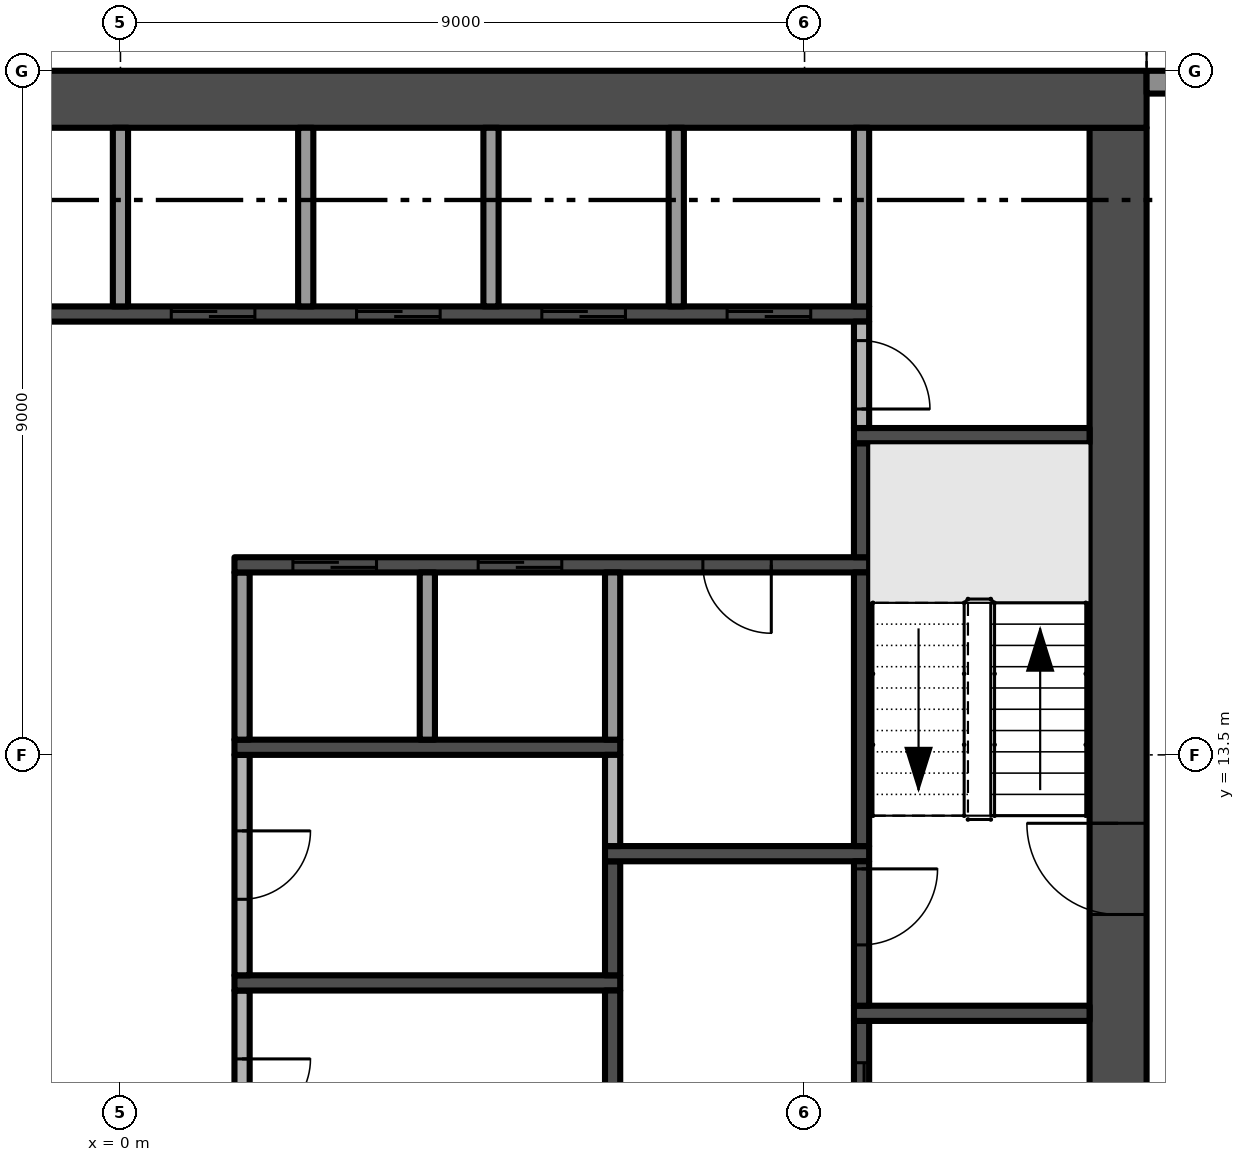
"""IFC4 building model, lengths in metres.
Left out: names, types, materials, properties, quantities, classifications, styles, units other than length and angle.
Written with IfcOpenShell. Run it as: python <this file> out.ifc"""

import sys

from ifc_helpers import new_model, si_unit, direction, frame, frame_2d, origin, place, context, subcontext, project, spatial, rectangle, extrude, element, fill, save


model = new_model("IFC4")
c1 = context("Model", 3, precision=1e-05, world=origin(), true_north=direction((0.0, 1.0)))
c2 = subcontext(c1, "Body", "Model", "MODEL_VIEW")
j1 = project(units=[si_unit("LENGTHUNIT", "METRE"), si_unit("PLANEANGLEUNIT", "RADIAN")], contexts=[c1])
p1 = place(None, origin())
s1 = spatial("IfcSite", under=j1, at=p1, CompositionType="ELEMENT")
p2 = place(p1, origin())
s2 = spatial("IfcBuilding", under=s1, at=p2, CompositionType="ELEMENT")
p3 = place(p2, frame((0.0, 0.0, 170.6)))
s3 = spatial("IfcBuildingStorey", under=s2, at=p3, CompositionType="ELEMENT", Elevation=170.6)
p4 = place(p3, frame((13.125, 5.25, -0.3), z_axis=(0.0, 0.0, 1.0), x_axis=(0.0, 1.0, 0.0)))
e1 = element("IfcWall", 1, at=p4, inside=s3, PredefinedType="SHEAR", context=c2, shape_type="SweptSolid", body=[
    extrude(rectangle(XDim=16.5, YDim=0.75, at=frame_2d((8.25, 0.0))), origin(), (0.0, 0.0, 1.0), 3.8),
])
p5 = place(p4, frame((6.15, 0.0, 0.3)))
e2 = element("IfcOpeningElement", 2, at=p5, cuts=e1, PredefinedType="OPENING", context=c2, shape_type="SweptSolid", body=[
    extrude(rectangle(XDim=1.2, YDim=2.2, at=frame_2d((0.6, 1.1))), frame((0.0, 0.385, 0.0), z_axis=(0.0, -1.0, 0.0), x_axis=(1.0, 0.0, 0.0)), (0.0, 0.0, 1.0), 0.77),
])
p6 = place(p3, frame((13.5, 22.125, -0.3), z_axis=(0.0, 0.0, 1.0), x_axis=(-1.0, 0.0, 0.0)))
e3 = element("IfcWall", 3, at=p6, inside=s3, PredefinedType="SHEAR", context=c2, shape_type="SweptSolid", body=[
    extrude(rectangle(XDim=27.0, YDim=0.75, at=frame_2d((13.5, 0.0))), origin(), (0.0, 0.0, 1.0), 3.8),
])
p7 = place(p3, frame((13.5, 22.35, 0.0), z_axis=(0.0, 0.0, 1.0), x_axis=(1.0, 0.0, 0.0)))
e4 = element("IfcWall", 4, at=p7, inside=s3, PredefinedType="SOLIDWALL", context=c2, shape_type="SweptSolid", body=[
    extrude(rectangle(XDim=3.4, YDim=0.3, at=frame_2d((1.7, 0.0))), origin(), (0.0, 0.0, 1.0), 3.5),
])
p8 = place(p7, frame((0.7, 0.0, 0.0)))
e5 = element("IfcOpeningElement", 5, at=p8, cuts=e4, PredefinedType="OPENING", context=c2, shape_type="SweptSolid", body=[
    extrude(rectangle(XDim=2.4, YDim=2.4, at=frame_2d((1.2, 1.2))), frame((0.0, 0.16, 0.0), z_axis=(0.0, -1.0, 0.0), x_axis=(1.0, 0.0, 0.0)), (0.0, 0.0, 1.0), 0.32),
])
p9 = place(p3, frame((-9.85, 19.3, 0.0), z_axis=(0.0, 0.0, 1.0), x_axis=(1.0, 0.0, 0.0)))
e6 = element("IfcWall", 6, at=p9, inside=s3, PredefinedType="SHEAR", context=c2, shape_type="SweptSolid", body=[
    extrude(rectangle(XDim=19.7, YDim=0.2, at=frame_2d((9.85, 0.0))), origin(), (0.0, 0.0, 1.0), 3.5),
])
p10 = place(p9, frame((10.519, 0.0, 0.0)))
e7 = element("IfcOpeningElement", 7, at=p10, cuts=e6, PredefinedType="OPENING", context=c2, shape_type="SweptSolid", body=[
    extrude(rectangle(XDim=1.1, YDim=2.1, at=frame_2d((0.55, 1.05))), frame((0.0, 0.11, 0.0), z_axis=(0.0, -1.0, 0.0), x_axis=(1.0, 0.0, 0.0)), (0.0, 0.0, 1.0), 0.22),
])
p11 = place(p9, frame((12.956, 0.0, 0.0)))
e8 = element("IfcOpeningElement", 8, at=p11, cuts=e6, PredefinedType="OPENING", context=c2, shape_type="SweptSolid", body=[
    extrude(rectangle(XDim=1.1, YDim=2.1, at=frame_2d((0.55, 1.05))), frame((0.0, 0.11, 0.0), z_axis=(0.0, -1.0, 0.0), x_axis=(1.0, 0.0, 0.0)), (0.0, 0.0, 1.0), 0.22),
])
p12 = place(p9, frame((15.394, 0.0, 0.0)))
e9 = element("IfcOpeningElement", 9, at=p12, cuts=e6, PredefinedType="OPENING", context=c2, shape_type="SweptSolid", body=[
    extrude(rectangle(XDim=1.1, YDim=2.1, at=frame_2d((0.55, 1.05))), frame((0.0, 0.11, 0.0), z_axis=(0.0, -1.0, 0.0), x_axis=(1.0, 0.0, 0.0)), (0.0, 0.0, 1.0), 0.22),
])
p13 = place(p9, frame((17.831, 0.0, 0.0)))
e10 = element("IfcOpeningElement", 10, at=p13, cuts=e6, PredefinedType="OPENING", context=c2, shape_type="SweptSolid", body=[
    extrude(rectangle(XDim=1.1, YDim=2.1, at=frame_2d((0.55, 1.05))), frame((0.0, 0.11, 0.0), z_axis=(0.0, -1.0, 0.0), x_axis=(1.0, 0.0, 0.0)), (0.0, 0.0, 1.0), 0.22),
])
p14 = place(p9, frame((2.087, 0.0, 0.0)))
e11 = element("IfcOpeningElement", 11, at=p14, cuts=e6, PredefinedType="OPENING", context=c2, shape_type="SweptSolid", body=[
    extrude(rectangle(XDim=0.9, YDim=2.1, at=frame_2d((0.45, 1.05))), frame((0.0, 0.11, 0.0), z_axis=(0.0, -1.0, 0.0), x_axis=(1.0, 0.0, 0.0)), (0.0, 0.0, 1.0), 0.22),
])
p15 = place(p9, frame((6.963, 0.0, 0.0)))
e12 = element("IfcOpeningElement", 12, at=p15, cuts=e6, PredefinedType="OPENING", context=c2, shape_type="SweptSolid", body=[
    extrude(rectangle(XDim=0.9, YDim=2.1, at=frame_2d((0.45, 1.05))), frame((0.0, 0.11, 0.0), z_axis=(0.0, -1.0, 0.0), x_axis=(1.0, 0.0, 0.0)), (0.0, 0.0, 1.0), 0.22),
])
p16 = place(p3, frame((0.0, 19.4, 0.0), z_axis=(0.0, 0.0, 1.0), x_axis=(0.0, 1.0, 0.0)))
e13 = element("IfcWall", 13, at=p16, inside=s3, PredefinedType="PARTITIONING", context=c2, shape_type="SweptSolid", body=[
    extrude(rectangle(XDim=2.35, YDim=0.2, at=frame_2d((1.175, 0.0))), origin(), (0.0, 0.0, 1.0), 3.5),
])
p17 = place(p3, frame((1.6, 10.4, 0.0), z_axis=(0.0, 0.0, 1.0), x_axis=(0.0, -1.0, 0.0)))
e14 = element("IfcWall", 14, at=p17, inside=s3, PredefinedType="PARTITIONING", context=c2, shape_type="SweptSolid", body=[
    extrude(rectangle(XDim=2.7, YDim=0.2, at=frame_2d((1.35, 0.0))), origin(), (0.0, 0.0, 1.0), 3.5),
])
p18 = place(p17, frame((0.9, 0.0, 0.0)))
e15 = element("IfcOpeningElement", 15, at=p18, cuts=e14, PredefinedType="OPENING", context=c2, shape_type="SweptSolid", body=[
    extrude(rectangle(XDim=0.9, YDim=2.1, at=frame_2d((0.45, 1.05))), frame((0.0, 0.11, 0.0), z_axis=(0.0, -1.0, 0.0), x_axis=(1.0, 0.0, 0.0)), (0.0, 0.0, 1.0), 0.22),
])
p19 = place(p3, frame((1.5, 10.5, 0.0), z_axis=(0.0, 0.0, 1.0), x_axis=(1.0, 0.0, 0.0)))
e16 = element("IfcWall", 16, at=p19, inside=s3, PredefinedType="SHEAR", context=c2, shape_type="SweptSolid", body=[
    extrude(rectangle(XDim=5.075, YDim=0.2, at=frame_2d((2.538, 0.0))), origin(), (0.0, 0.0, 1.0), 3.5),
])
p20 = place(p3, frame((1.6, 13.5, 0.0), z_axis=(0.0, 0.0, 1.0), x_axis=(0.0, -1.0, 0.0)))
e17 = element("IfcWall", 17, at=p20, inside=s3, PredefinedType="PARTITIONING", context=c2, shape_type="SweptSolid", body=[
    extrude(rectangle(XDim=2.9, YDim=0.2, at=frame_2d((1.45, 0.0))), origin(), (0.0, 0.0, 1.0), 3.5),
])
p21 = place(p20, frame((1.0, 0.0, 0.0)))
e18 = element("IfcOpeningElement", 18, at=p21, cuts=e17, PredefinedType="OPENING", context=c2, shape_type="SweptSolid", body=[
    extrude(rectangle(XDim=0.9, YDim=2.1, at=frame_2d((0.45, 1.05))), frame((0.0, 0.11, 0.0), z_axis=(0.0, -1.0, 0.0), x_axis=(1.0, 0.0, 0.0)), (0.0, 0.0, 1.0), 0.22),
])
p22 = place(p3, frame((1.5, 13.6, 0.0), z_axis=(0.0, 0.0, 1.0), x_axis=(1.0, 0.0, 0.0)))
e19 = element("IfcWall", 19, at=p22, inside=s3, PredefinedType="SHEAR", context=c2, shape_type="SweptSolid", body=[
    extrude(rectangle(XDim=5.075, YDim=0.2, at=frame_2d((2.538, 0.0))), origin(), (0.0, 0.0, 1.0), 3.5),
])
p23 = place(p3, frame((1.6, 13.7, 0.0), z_axis=(0.0, 0.0, 1.0), x_axis=(0.0, 1.0, 0.0)))
e20 = element("IfcWall", 20, at=p23, inside=s3, PredefinedType="PARTITIONING", context=c2, shape_type="SweptSolid", body=[
    extrude(rectangle(XDim=2.2, YDim=0.2, at=frame_2d((1.1, 0.0))), origin(), (0.0, 0.0, 1.0), 3.5),
])
p24 = place(p3, frame((9.85, 16.0, 0.0), z_axis=(0.0, 0.0, 1.0), x_axis=(-1.0, 0.0, 0.0)))
e21 = element("IfcWall", 21, at=p24, inside=s3, PredefinedType="SHEAR", context=c2, shape_type="SweptSolid", body=[
    extrude(rectangle(XDim=8.35, YDim=0.2, at=frame_2d((4.175, 0.0))), origin(), (0.0, 0.0, 1.0), 3.5),
])
p25 = place(p24, frame((6.481, 0.0, 0.0)))
e22 = element("IfcOpeningElement", 22, at=p25, cuts=e21, PredefinedType="OPENING", context=c2, shape_type="SweptSolid", body=[
    extrude(rectangle(XDim=1.1, YDim=2.1, at=frame_2d((0.55, 1.05))), frame((0.0, 0.11, 0.0), z_axis=(0.0, -1.0, 0.0), x_axis=(1.0, 0.0, 0.0)), (0.0, 0.0, 1.0), 0.22),
])
p26 = place(p24, frame((4.044, 0.0, 0.0)))
e23 = element("IfcOpeningElement", 23, at=p26, cuts=e21, PredefinedType="OPENING", context=c2, shape_type="SweptSolid", body=[
    extrude(rectangle(XDim=1.1, YDim=2.1, at=frame_2d((0.55, 1.05))), frame((0.0, 0.11, 0.0), z_axis=(0.0, -1.0, 0.0), x_axis=(1.0, 0.0, 0.0)), (0.0, 0.0, 1.0), 0.22),
])
p27 = place(p24, frame((1.288, 0.0, 0.0)))
e24 = element("IfcOpeningElement", 24, at=p27, cuts=e21, PredefinedType="OPENING", context=c2, shape_type="SweptSolid", body=[
    extrude(rectangle(XDim=0.9, YDim=2.1, at=frame_2d((0.45, 1.05))), frame((0.0, 0.11, 0.0), z_axis=(0.0, -1.0, 0.0), x_axis=(1.0, 0.0, 0.0)), (0.0, 0.0, 1.0), 0.22),
])
p28 = place(p3, frame((2.438, 19.4, 0.0), z_axis=(0.0, 0.0, 1.0), x_axis=(0.0, 1.0, 0.0)))
e25 = element("IfcWall", 25, at=p28, inside=s3, PredefinedType="PARTITIONING", context=c2, shape_type="SweptSolid", body=[
    extrude(rectangle(XDim=2.35, YDim=0.2, at=frame_2d((1.175, 0.0))), origin(), (0.0, 0.0, 1.0), 3.5),
])
p29 = place(p3, frame((4.037, 13.7, 0.0), z_axis=(0.0, 0.0, 1.0), x_axis=(0.0, 1.0, 0.0)))
e26 = element("IfcWall", 26, at=p29, inside=s3, PredefinedType="PARTITIONING", context=c2, shape_type="SweptSolid", body=[
    extrude(rectangle(XDim=2.2, YDim=0.2, at=frame_2d((1.1, 0.0))), origin(), (0.0, 0.0, 1.0), 3.5),
])
p30 = place(p3, frame((4.875, 19.4, 0.0), z_axis=(0.0, 0.0, 1.0), x_axis=(0.0, 1.0, 0.0)))
e27 = element("IfcWall", 27, at=p30, inside=s3, PredefinedType="PARTITIONING", context=c2, shape_type="SweptSolid", body=[
    extrude(rectangle(XDim=2.35, YDim=0.2, at=frame_2d((1.175, 0.0))), origin(), (0.0, 0.0, 1.0), 3.5),
])
p31 = place(p3, frame((6.475, 7.7, 0.0), z_axis=(0.0, 0.0, 1.0), x_axis=(0.0, 1.0, 0.0)))
e28 = element("IfcWall", 28, at=p31, inside=s3, PredefinedType="SHEAR", context=c2, shape_type="SweptSolid", body=[
    extrude(rectangle(XDim=2.7, YDim=0.2, at=frame_2d((1.35, 0.0))), origin(), (0.0, 0.0, 1.0), 3.5),
])
p32 = place(p3, frame((6.475, 10.6, 0.0), z_axis=(0.0, 0.0, 1.0), x_axis=(0.0, 1.0, 0.0)))
e29 = element("IfcWall", 29, at=p32, inside=s3, PredefinedType="SHEAR", context=c2, shape_type="SweptSolid", body=[
    extrude(rectangle(XDim=1.5, YDim=0.2, at=frame_2d((0.75, 0.0))), origin(), (0.0, 0.0, 1.0), 3.5),
])
p33 = place(p3, frame((6.375, 12.2, 0.0), z_axis=(0.0, 0.0, 1.0), x_axis=(1.0, 0.0, 0.0)))
e30 = element("IfcWall", 30, at=p33, inside=s3, PredefinedType="SHEAR", context=c2, shape_type="SweptSolid", body=[
    extrude(rectangle(XDim=3.475, YDim=0.2, at=frame_2d((1.738, 0.0))), origin(), (0.0, 0.0, 1.0), 3.5),
])
p34 = place(p3, frame((6.475, 12.3, 0.0), z_axis=(0.0, 0.0, 1.0), x_axis=(0.0, 1.0, 0.0)))
e31 = element("IfcWall", 31, at=p34, inside=s3, PredefinedType="PARTITIONING", context=c2, shape_type="SweptSolid", body=[
    extrude(rectangle(XDim=1.2, YDim=0.2, at=frame_2d((0.6, 0.0))), origin(), (0.0, 0.0, 1.0), 3.5),
])
p35 = place(p3, frame((6.475, 13.7, 0.0), z_axis=(0.0, 0.0, 1.0), x_axis=(0.0, 1.0, 0.0)))
e32 = element("IfcWall", 32, at=p35, inside=s3, PredefinedType="PARTITIONING", context=c2, shape_type="SweptSolid", body=[
    extrude(rectangle(XDim=2.2, YDim=0.2, at=frame_2d((1.1, 0.0))), origin(), (0.0, 0.0, 1.0), 3.5),
])
p36 = place(p3, frame((7.312, 19.4, 0.0), z_axis=(0.0, 0.0, 1.0), x_axis=(0.0, 1.0, 0.0)))
e33 = element("IfcWall", 33, at=p36, inside=s3, PredefinedType="PARTITIONING", context=c2, shape_type="SweptSolid", body=[
    extrude(rectangle(XDim=2.35, YDim=0.2, at=frame_2d((1.175, 0.0))), origin(), (0.0, 0.0, 1.0), 3.5),
])
p37 = place(p3, frame((9.75, 7.8, 0.0), z_axis=(0.0, 0.0, 1.0), x_axis=(0.0, 1.0, 0.0)))
e34 = element("IfcWall", 34, at=p37, inside=s3, PredefinedType="SHEAR", context=c2, shape_type="SweptSolid", body=[
    extrude(rectangle(XDim=2.2, YDim=0.2, at=frame_2d((1.1, 0.0))), origin(), (0.0, 0.0, 1.0), 3.5),
])
p38 = place(p37, frame((0.55, 0.0, 0.0)))
e35 = element("IfcOpeningElement", 35, at=p38, cuts=e34, PredefinedType="OPENING", context=c2, shape_type="SweptSolid", body=[
    extrude(rectangle(XDim=1.1, YDim=2.1, at=frame_2d((0.55, 1.05))), frame((0.0, 0.11, 0.0), z_axis=(0.0, -1.0, 0.0), x_axis=(1.0, 0.0, 0.0)), (0.0, 0.0, 1.0), 0.22),
])
p39 = place(p3, frame((9.65, 10.1, 0.0), z_axis=(0.0, 0.0, 1.0), x_axis=(1.0, 0.0, 0.0)))
e36 = element("IfcWall", 36, at=p39, inside=s3, PredefinedType="SHEAR", context=c2, shape_type="SweptSolid", body=[
    extrude(rectangle(XDim=3.1, YDim=0.2, at=frame_2d((1.55, 0.0))), origin(), (0.0, 0.0, 1.0), 3.5),
])
p40 = place(p3, frame((9.75, 12.1, 0.0), z_axis=(0.0, 0.0, 1.0), x_axis=(0.0, -1.0, 0.0)))
e37 = element("IfcWall", 37, at=p40, inside=s3, PredefinedType="SHEAR", context=c2, shape_type="SweptSolid", body=[
    extrude(rectangle(XDim=1.9, YDim=0.2, at=frame_2d((0.95, 0.0))), origin(), (0.0, 0.0, 1.0), 3.5),
])
p41 = place(p40, frame((0.1, 0.0, 0.0)))
e38 = element("IfcOpeningElement", 38, at=p41, cuts=e37, PredefinedType="OPENING", context=c2, shape_type="SweptSolid", body=[
    extrude(rectangle(XDim=1.0, YDim=2.2, at=frame_2d((0.5, 1.1))), frame((0.0, 0.11, 0.0), z_axis=(0.0, -1.0, 0.0), x_axis=(1.0, 0.0, 0.0)), (0.0, 0.0, 1.0), 0.22),
])
p42 = place(p3, frame((9.75, 12.3, 0.0), z_axis=(0.0, 0.0, 1.0), x_axis=(0.0, 1.0, 0.0)))
e39 = element("IfcWall", 39, at=p42, inside=s3, PredefinedType="SHEAR", context=c2, shape_type="SweptSolid", body=[
    extrude(rectangle(XDim=3.6, YDim=0.2, at=frame_2d((1.8, 0.0))), origin(), (0.0, 0.0, 1.0), 3.5),
])
p43 = place(p3, frame((9.75, 16.1, 0.0), z_axis=(0.0, 0.0, 1.0), x_axis=(0.0, 1.0, 0.0)))
e40 = element("IfcWall", 40, at=p43, inside=s3, PredefinedType="SHEAR", context=c2, shape_type="SweptSolid", body=[
    extrude(rectangle(XDim=1.5, YDim=0.2, at=frame_2d((0.75, 0.0))), origin(), (0.0, 0.0, 1.0), 3.5),
])
p44 = place(p3, frame((9.65, 17.7, 0.0), z_axis=(0.0, 0.0, 1.0), x_axis=(1.0, 0.0, 0.0)))
e41 = element("IfcWall", 41, at=p44, inside=s3, PredefinedType="SHEAR", context=c2, shape_type="SweptSolid", body=[
    extrude(rectangle(XDim=3.1, YDim=0.2, at=frame_2d((1.55, 0.0))), origin(), (0.0, 0.0, 1.0), 3.5),
])
p45 = place(p3, frame((9.75, 19.2, 0.0), z_axis=(0.0, 0.0, 1.0), x_axis=(0.0, -1.0, 0.0)))
e42 = element("IfcWall", 42, at=p45, inside=s3, PredefinedType="PARTITIONING", context=c2, shape_type="SweptSolid", body=[
    extrude(rectangle(XDim=1.4, YDim=0.2, at=frame_2d((0.7, 0.0))), origin(), (0.0, 0.0, 1.0), 3.5),
])
p46 = place(p45, frame((0.25, 0.0, 0.0)))
e43 = element("IfcOpeningElement", 43, at=p46, cuts=e42, PredefinedType="OPENING", context=c2, shape_type="SweptSolid", body=[
    extrude(rectangle(XDim=0.9, YDim=2.1, at=frame_2d((0.45, 1.05))), frame((0.0, 0.11, 0.0), z_axis=(0.0, -1.0, 0.0), x_axis=(1.0, 0.0, 0.0)), (0.0, 0.0, 1.0), 0.22),
])
p47 = place(p3, frame((9.75, 19.4, 0.0), z_axis=(0.0, 0.0, 1.0), x_axis=(0.0, 1.0, 0.0)))
e44 = element("IfcWall", 44, at=p47, inside=s3, PredefinedType="PARTITIONING", context=c2, shape_type="SweptSolid", body=[
    extrude(rectangle(XDim=2.35, YDim=0.2, at=frame_2d((1.175, 0.0))), origin(), (0.0, 0.0, 1.0), 3.5),
])
p48 = place(p5, frame((1.2, 0.0, 0.0), z_axis=(0.0, 0.0, 1.0), x_axis=(-1.0, 0.0, 0.0)))
e45 = element("IfcDoor", 45, at=p48, inside=s3, OperationType="SINGLE_SWING_LEFT", PredefinedType="DOOR", context=c2, shape_type="SweptSolid", body=[
    extrude(rectangle(XDim=1.2, YDim=2.2, at=frame_2d((0.6, 1.1))), frame((0.0, 0.025, 0.0), z_axis=(0.0, -1.0, 0.0), x_axis=(1.0, 0.0, 0.0)), (0.0, 0.0, 1.0), 0.05),
])
fill(e2, e45)
p49 = place(p41, origin())
e46 = element("IfcDoor", 46, at=p49, inside=s3, OperationType="SINGLE_SWING_LEFT", PredefinedType="DOOR", context=c2, shape_type="SweptSolid", body=[
    extrude(rectangle(XDim=1.0, YDim=2.2, at=frame_2d((0.5, 1.1))), frame((0.0, 0.025, 0.0), z_axis=(0.0, -1.0, 0.0), x_axis=(1.0, 0.0, 0.0)), (0.0, 0.0, 1.0), 0.05),
])
fill(e38, e46)
p50 = place(p10, origin())
e47 = element("IfcDoor", 47, at=p50, inside=s3, OperationType="SLIDING_TO_RIGHT", PredefinedType="DOOR", context=c2, shape_type="SweptSolid", body=[
    extrude(rectangle(XDim=1.1, YDim=2.1, at=frame_2d((0.55, 1.05))), frame((0.0, 0.025, 0.0), z_axis=(0.0, -1.0, 0.0), x_axis=(1.0, 0.0, 0.0)), (0.0, 0.0, 1.0), 0.05),
])
fill(e7, e47)
p51 = place(p11, origin())
e48 = element("IfcDoor", 48, at=p51, inside=s3, OperationType="SLIDING_TO_RIGHT", PredefinedType="DOOR", context=c2, shape_type="SweptSolid", body=[
    extrude(rectangle(XDim=1.1, YDim=2.1, at=frame_2d((0.55, 1.05))), frame((0.0, 0.025, 0.0), z_axis=(0.0, -1.0, 0.0), x_axis=(1.0, 0.0, 0.0)), (0.0, 0.0, 1.0), 0.05),
])
fill(e8, e48)
p52 = place(p12, origin())
e49 = element("IfcDoor", 49, at=p52, inside=s3, OperationType="SLIDING_TO_RIGHT", PredefinedType="DOOR", context=c2, shape_type="SweptSolid", body=[
    extrude(rectangle(XDim=1.1, YDim=2.1, at=frame_2d((0.55, 1.05))), frame((0.0, 0.025, 0.0), z_axis=(0.0, -1.0, 0.0), x_axis=(1.0, 0.0, 0.0)), (0.0, 0.0, 1.0), 0.05),
])
fill(e9, e49)
p53 = place(p13, origin())
e50 = element("IfcDoor", 50, at=p53, inside=s3, OperationType="SLIDING_TO_RIGHT", PredefinedType="DOOR", context=c2, shape_type="SweptSolid", body=[
    extrude(rectangle(XDim=1.1, YDim=2.1, at=frame_2d((0.55, 1.05))), frame((0.0, 0.025, 0.0), z_axis=(0.0, -1.0, 0.0), x_axis=(1.0, 0.0, 0.0)), (0.0, 0.0, 1.0), 0.05),
])
fill(e10, e50)
p54 = place(p25, origin())
e51 = element("IfcDoor", 51, at=p54, inside=s3, OperationType="SLIDING_TO_RIGHT", PredefinedType="DOOR", context=c2, shape_type="SweptSolid", body=[
    extrude(rectangle(XDim=1.1, YDim=2.1, at=frame_2d((0.55, 1.05))), frame((0.0, 0.025, 0.0), z_axis=(0.0, -1.0, 0.0), x_axis=(1.0, 0.0, 0.0)), (0.0, 0.0, 1.0), 0.05),
])
fill(e22, e51)
p55 = place(p26, origin())
e52 = element("IfcDoor", 52, at=p55, inside=s3, OperationType="SLIDING_TO_RIGHT", PredefinedType="DOOR", context=c2, shape_type="SweptSolid", body=[
    extrude(rectangle(XDim=1.1, YDim=2.1, at=frame_2d((0.55, 1.05))), frame((0.0, 0.025, 0.0), z_axis=(0.0, -1.0, 0.0), x_axis=(1.0, 0.0, 0.0)), (0.0, 0.0, 1.0), 0.05),
])
fill(e23, e52)
p56 = place(p38, origin())
e53 = element("IfcDoor", 53, at=p56, inside=s3, OperationType="SLIDING_TO_RIGHT", PredefinedType="DOOR", context=c2, shape_type="SweptSolid", body=[
    extrude(rectangle(XDim=1.1, YDim=2.1, at=frame_2d((0.55, 1.05))), frame((0.0, 0.025, 0.0), z_axis=(0.0, -1.0, 0.0), x_axis=(1.0, 0.0, 0.0)), (0.0, 0.0, 1.0), 0.05),
])
fill(e35, e53)
p57 = place(p18, origin())
e54 = element("IfcDoor", 54, at=p57, inside=s3, OperationType="SINGLE_SWING_LEFT", PredefinedType="DOOR", context=c2, shape_type="SweptSolid", body=[
    extrude(rectangle(XDim=0.9, YDim=2.1, at=frame_2d((0.45, 1.05))), frame((0.0, 0.025, 0.0), z_axis=(0.0, -1.0, 0.0), x_axis=(1.0, 0.0, 0.0)), (0.0, 0.0, 1.0), 0.05),
])
fill(e15, e54)
p58 = place(p21, origin())
e55 = element("IfcDoor", 55, at=p58, inside=s3, OperationType="SINGLE_SWING_LEFT", PredefinedType="DOOR", context=c2, shape_type="SweptSolid", body=[
    extrude(rectangle(XDim=0.9, YDim=2.1, at=frame_2d((0.45, 1.05))), frame((0.0, 0.025, 0.0), z_axis=(0.0, -1.0, 0.0), x_axis=(1.0, 0.0, 0.0)), (0.0, 0.0, 1.0), 0.05),
])
fill(e18, e55)
p59 = place(p27, origin())
e56 = element("IfcDoor", 56, at=p59, inside=s3, OperationType="SINGLE_SWING_LEFT", PredefinedType="DOOR", context=c2, shape_type="SweptSolid", body=[
    extrude(rectangle(XDim=0.9, YDim=2.1, at=frame_2d((0.45, 1.05))), frame((0.0, 0.025, 0.0), z_axis=(0.0, -1.0, 0.0), x_axis=(1.0, 0.0, 0.0)), (0.0, 0.0, 1.0), 0.05),
])
fill(e24, e56)
p60 = place(p46, origin())
e57 = element("IfcDoor", 57, at=p60, inside=s3, OperationType="SINGLE_SWING_RIGHT", PredefinedType="DOOR", context=c2, shape_type="SweptSolid", body=[
    extrude(rectangle(XDim=0.9, YDim=2.1, at=frame_2d((0.45, 1.05))), frame((0.0, 0.025, 0.0), z_axis=(0.0, -1.0, 0.0), x_axis=(1.0, 0.0, 0.0)), (0.0, 0.0, 1.0), 0.05),
])
fill(e43, e57)
save(model, sys.argv[1])
